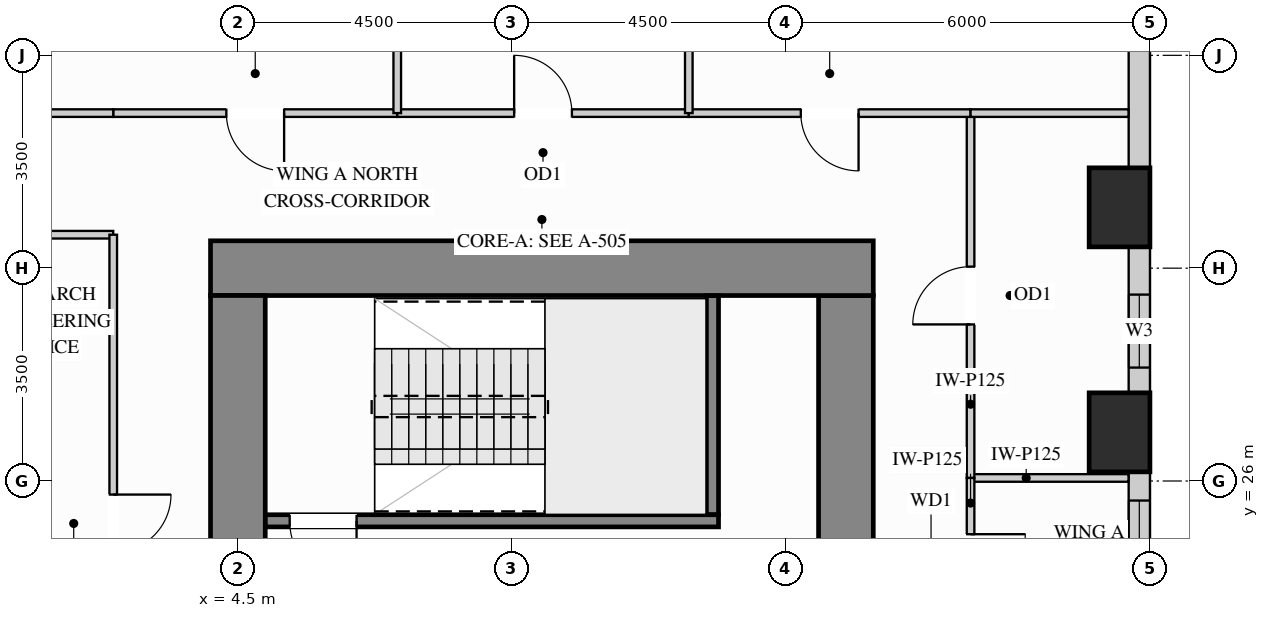
"""IFC4 building model, lengths in metres.
Left out: names, types, materials, properties, quantities, classifications, styles, units other than length and angle.
Written with IfcOpenShell. Run it as: python <this file> out.ifc"""

import sys

from ifc_helpers import new_model, si_unit, direction, frame, frame_2d, origin, origin_2d, place, context, subcontext, project, spatial, rectangle, extrude, source, transform, mapped, element, fill, save


model = new_model("IFC4")
c1 = context("Model", 3, precision=1e-05, world=origin(), true_north=direction((0.0, 1.0)))
c2 = subcontext(c1, "Body", "Model", "MODEL_VIEW")
j1 = project(units=[si_unit("LENGTHUNIT", "METRE"), si_unit("PLANEANGLEUNIT", "RADIAN")], contexts=[c1])
p1 = place(None, origin())
s1 = spatial("IfcSite", under=j1, at=p1, CompositionType="ELEMENT")
p2 = place(p1, origin())
s2 = spatial("IfcBuilding", under=s1, at=p2, CompositionType="ELEMENT")
p3 = place(p2, frame((0.0, 0.0, 58.5)))
s3 = spatial("IfcBuildingStorey", under=s2, at=p3, CompositionType="ELEMENT", Elevation=58.5)
m1 = source(origin(), c2, "Body", "SweptSolid", [
    extrude(rectangle(XDim=1.0, YDim=1.3, at=origin_2d()), origin(), (0.0, 0.0, 1.0), 3.38),
])
for number, where, z_axis, x_axis in (
    (1, (19.0, 26.8, 0.0), (0.0, 0.0, 1.0), (1.0, 0.0, 0.0)),
    (2, (19.0, 30.5, 0.0), (0.0, 0.0, 1.0), (1.0, 0.0, 0.0)),
):
    element("IfcColumn", number, at=place(p3, frame(where, z_axis=z_axis, x_axis=x_axis)), inside=s3, PredefinedType="COLUMN", context=c2, shape_type="MappedRepresentation", body=[
        mapped(m1, transform((0.0, 0.0, 0.0), x_axis=(1.0, 0.0, 0.0), y_axis=(0.0, 1.0, 0.0), z_axis=(0.0, 0.0, 1.0))),
    ])
m2 = source(origin(), c2, "Body", "SweptSolid", [
    extrude(rectangle(XDim=8.17, YDim=0.9, at=frame_2d((4.085, 0.0))), origin(), (0.0, 0.0, 1.0), 3.38),
])
p4 = place(p3, frame((14.5, 20.88, 0.0), z_axis=(0.0, 0.0, 1.0), x_axis=(0.0, 1.0, 0.0)))
e3 = element("IfcWall", 3, at=p4, inside=s3, PredefinedType="SHEAR", context=c2, shape_type="MappedRepresentation", body=[
    mapped(m2, transform((0.0, 0.0, 0.0), x_axis=(1.0, 0.0, 0.0), y_axis=(0.0, 1.0, 0.0), z_axis=(0.0, 0.0, 1.0))),
])
m3 = source(origin(), c2, "Body", "SweptSolid", [
    extrude(rectangle(XDim=10.9, YDim=0.9, at=frame_2d((5.45, 0.0))), origin(), (0.0, 0.0, 1.0), 3.38),
])
p5 = place(p3, frame((4.05, 29.5, 0.0), z_axis=(0.0, 0.0, 1.0), x_axis=(1.0, 0.0, 0.0)))
e4 = element("IfcWall", 4, at=p5, inside=s3, PredefinedType="SHEAR", context=c2, shape_type="MappedRepresentation", body=[
    mapped(m3, transform((0.0, 0.0, 0.0), x_axis=(1.0, 0.0, 0.0), y_axis=(0.0, 1.0, 0.0), z_axis=(0.0, 0.0, 1.0))),
])
m4 = source(origin(), c2, "Body", "SweptSolid", [
    extrude(rectangle(XDim=20.1, YDim=0.9, at=frame_2d((10.05, 0.0))), origin(), (0.0, 0.0, 1.0), 3.38),
])
p6 = place(p3, frame((4.5, 8.95, 0.0), z_axis=(0.0, 0.0, 1.0), x_axis=(0.0, 1.0, 0.0)))
e5 = element("IfcWall", 5, at=p6, inside=s3, PredefinedType="SHEAR", context=c2, shape_type="MappedRepresentation", body=[
    mapped(m4, transform((0.0, 0.0, 0.0), x_axis=(1.0, 0.0, 0.0), y_axis=(0.0, 1.0, 0.0), z_axis=(0.0, 0.0, 1.0))),
])
p7 = place(p3, frame((19.325, 23.148, 0.0), z_axis=(0.0, 0.0, 1.0), x_axis=(0.0, 1.0, 0.0)))
e6 = element("IfcWall", 6, at=p7, inside=s3, PredefinedType="SOLIDWALL", context=c2, shape_type="SweptSolid", body=[
    extrude(rectangle(XDim=3.004, YDim=0.35, at=frame_2d((1.502, 0.0))), origin(), (0.0, 0.0, 1.0), 2.51),
])
p8 = place(p7, frame((1.031, 0.0, 0.78)))
e7 = element("IfcOpeningElement", 7, at=p8, cuts=e6, PredefinedType="OPENING", context=c2, shape_type="SweptSolid", body=[
    extrude(rectangle(XDim=1.5, YDim=1.55, at=frame_2d((0.75, 0.775))), frame((0.0, 0.185, 0.0), z_axis=(0.0, -1.0, 0.0), x_axis=(1.0, 0.0, 0.0)), (0.0, 0.0, 1.0), 0.37),
])
p9 = place(p3, frame((19.325, 27.448, 0.0), z_axis=(0.0, 0.0, 1.0), x_axis=(0.0, 1.0, 0.0)))
e8 = element("IfcWall", 8, at=p9, inside=s3, PredefinedType="SOLIDWALL", context=c2, shape_type="SweptSolid", body=[
    extrude(rectangle(XDim=2.404, YDim=0.35, at=frame_2d((1.202, 0.0))), origin(), (0.0, 0.0, 1.0), 2.51),
])
p10 = place(p9, frame((0.417, 0.0, 0.78)))
e9 = element("IfcOpeningElement", 9, at=p10, cuts=e8, PredefinedType="OPENING", context=c2, shape_type="SweptSolid", body=[
    extrude(rectangle(XDim=1.2, YDim=1.55, at=frame_2d((0.6, 0.775))), frame((0.0, 0.185, 0.0), z_axis=(0.0, -1.0, 0.0), x_axis=(1.0, 0.0, 0.0)), (0.0, 0.0, 1.0), 0.37),
])
m5 = source(origin(), c2, "Body", "SweptSolid", [
    extrude(rectangle(XDim=3.204, YDim=0.35, at=frame_2d((1.602, 0.0))), origin(), (0.0, 0.0, 1.0), 2.51),
])
p11 = place(p3, frame((19.325, 31.148, 0.0), z_axis=(0.0, 0.0, 1.0), x_axis=(0.0, 1.0, 0.0)))
e10 = element("IfcWall", 10, at=p11, inside=s3, PredefinedType="SOLIDWALL", context=c2, shape_type="MappedRepresentation", body=[
    mapped(m5, transform((0.0, 0.0, 0.0), x_axis=(1.0, 0.0, 0.0), y_axis=(0.0, 1.0, 0.0), z_axis=(0.0, 0.0, 1.0))),
])
m6 = source(origin(), c2, "Body", "SweptSolid", [
    extrude(rectangle(XDim=2.598, YDim=0.125, at=frame_2d((1.299, 0.0))), origin(), (0.0, 0.0, 1.0), 3.365),
])
p12 = place(p3, frame((16.55, 26.05, 0.0), z_axis=(0.0, 0.0, 1.0), x_axis=(1.0, 0.0, 0.0)))
e11 = element("IfcWall", 11, at=p12, inside=s3, PredefinedType="PARTITIONING", context=c2, shape_type="MappedRepresentation", body=[
    mapped(m6, transform((0.0, 0.0, 0.0), x_axis=(1.0, 0.0, 0.0), y_axis=(0.0, 1.0, 0.0), z_axis=(0.0, 0.0, 1.0))),
])
p13 = place(p3, frame((16.55, 26.05, 0.0), z_axis=(0.0, 0.0, 1.0), x_axis=(0.0, 1.0, 0.0)))
e12 = element("IfcWall", 12, at=p13, inside=s3, PredefinedType="PARTITIONING", context=c2, shape_type="SweptSolid", body=[
    extrude(rectangle(XDim=6.0, YDim=0.125, at=frame_2d((3.0, 0.0))), origin(), (0.0, 0.0, 1.0), 3.365),
])
p14 = place(p13, frame((2.525, 0.0, 0.0)))
e13 = element("IfcOpeningElement", 13, at=p14, cuts=e12, PredefinedType="OPENING", context=c2, shape_type="SweptSolid", body=[
    extrude(rectangle(XDim=0.95, YDim=2.15, at=frame_2d((0.475, 1.075))), frame((0.0, 0.073, 0.0), z_axis=(0.0, -1.0, 0.0), x_axis=(1.0, 0.0, 0.0)), (0.0, 0.0, 1.0), 0.145),
])
p15 = place(p3, frame((16.55, 23.35, 0.0), z_axis=(0.0, 0.0, 1.0), x_axis=(0.0, 1.0, 0.0)))
e14 = element("IfcWall", 14, at=p15, inside=s3, PredefinedType="PARTITIONING", context=c2, shape_type="SweptSolid", body=[
    extrude(rectangle(XDim=2.7, YDim=0.125, at=frame_2d((1.35, 0.0))), origin(), (0.0, 0.0, 1.0), 3.365),
])
p16 = place(p15, frame((0.875, 0.0, 0.0)))
e15 = element("IfcOpeningElement", 15, at=p16, cuts=e14, PredefinedType="OPENING", context=c2, shape_type="SweptSolid", body=[
    extrude(rectangle(XDim=0.9, YDim=2.15, at=frame_2d((0.45, 1.075))), frame((0.0, 0.073, 0.0), z_axis=(0.0, -1.0, 0.0), x_axis=(1.0, 0.0, 0.0)), (0.0, 0.0, 1.0), 0.145),
])
p17 = place(p3, frame((2.45, 32.05, 0.0), z_axis=(0.0, 0.0, 1.0), x_axis=(1.0, 0.0, 0.0)))
e16 = element("IfcWall", 16, at=p17, inside=s3, PredefinedType="PARTITIONING", context=c2, shape_type="SweptSolid", body=[
    extrude(rectangle(XDim=4.671, YDim=0.125, at=frame_2d((2.335, 0.0))), origin(), (0.0, 0.0, 1.0), 3.365),
])
p18 = place(p17, frame((1.861, 0.0, 0.0)))
e17 = element("IfcOpeningElement", 17, at=p18, cuts=e16, PredefinedType="OPENING", context=c2, shape_type="SweptSolid", body=[
    extrude(rectangle(XDim=0.95, YDim=2.15, at=frame_2d((0.475, 1.075))), frame((0.0, 0.073, 0.0), z_axis=(0.0, -1.0, 0.0), x_axis=(1.0, 0.0, 0.0)), (0.0, 0.0, 1.0), 0.145),
])
p19 = place(p3, frame((7.121, 32.05, 0.0), z_axis=(0.0, 0.0, 1.0), x_axis=(1.0, 0.0, 0.0)))
e18 = element("IfcWall", 18, at=p19, inside=s3, PredefinedType="PARTITIONING", context=c2, shape_type="SweptSolid", body=[
    extrude(rectangle(XDim=4.795, YDim=0.125, at=frame_2d((2.397, 0.0))), origin(), (0.0, 0.0, 1.0), 3.365),
])
p20 = place(p19, frame((1.923, 0.0, 0.0)))
e19 = element("IfcOpeningElement", 19, at=p20, cuts=e18, PredefinedType="OPENING", context=c2, shape_type="SweptSolid", body=[
    extrude(rectangle(XDim=0.95, YDim=2.15, at=frame_2d((0.475, 1.075))), frame((0.0, 0.073, 0.0), z_axis=(0.0, -1.0, 0.0), x_axis=(1.0, 0.0, 0.0)), (0.0, 0.0, 1.0), 0.145),
])
p21 = place(p3, frame((11.916, 32.05, 0.0), z_axis=(0.0, 0.0, 1.0), x_axis=(1.0, 0.0, 0.0)))
e20 = element("IfcWall", 20, at=p21, inside=s3, PredefinedType="PARTITIONING", context=c2, shape_type="SweptSolid", body=[
    extrude(rectangle(XDim=4.634, YDim=0.125, at=frame_2d((2.317, 0.0))), origin(), (0.0, 0.0, 1.0), 3.365),
])
p22 = place(p21, frame((1.842, 0.0, 0.0)))
e21 = element("IfcOpeningElement", 21, at=p22, cuts=e20, PredefinedType="OPENING", context=c2, shape_type="SweptSolid", body=[
    extrude(rectangle(XDim=0.95, YDim=2.15, at=frame_2d((0.475, 1.075))), frame((0.0, 0.073, 0.0), z_axis=(0.0, -1.0, 0.0), x_axis=(1.0, 0.0, 0.0)), (0.0, 0.0, 1.0), 0.145),
])
p23 = place(p3, frame((16.55, 32.05, 0.0), z_axis=(0.0, 0.0, 1.0), x_axis=(1.0, 0.0, 0.0)))
e22 = element("IfcWall", 22, at=p23, inside=s3, PredefinedType="PARTITIONING", context=c2, shape_type="MappedRepresentation", body=[
    mapped(m6, transform((0.0, 0.0, 0.0), x_axis=(1.0, 0.0, 0.0), y_axis=(0.0, 1.0, 0.0), z_axis=(0.0, 0.0, 1.0))),
])
m7 = source(origin(), c2, "Body", "SweptSolid", [
    extrude(rectangle(XDim=2.098, YDim=0.125, at=frame_2d((1.049, 0.0))), origin(), (0.0, 0.0, 1.0), 3.365),
])
p24 = place(p3, frame((0.352, 32.05, 0.0), z_axis=(0.0, 0.0, 1.0), x_axis=(1.0, 0.0, 0.0)))
e23 = element("IfcWall", 23, at=p24, inside=s3, PredefinedType="PARTITIONING", context=c2, shape_type="MappedRepresentation", body=[
    mapped(m7, transform((0.0, 0.0, 0.0), x_axis=(1.0, 0.0, 0.0), y_axis=(0.0, 1.0, 0.0), z_axis=(0.0, 0.0, 1.0))),
])
m8 = source(origin(), c2, "Body", "SweptSolid", [
    extrude(rectangle(XDim=17.598, YDim=0.125, at=frame_2d((8.799, 0.0))), origin(), (0.0, 0.0, 1.0), 3.365),
])
for number, where, z_axis, x_axis in (
    (24, (7.121, 32.05, 0.0), (0.0, 0.0, 1.0), (0.0, 1.0, 0.0)),
    (25, (11.916, 32.05, 0.0), (0.0, 0.0, 1.0), (0.0, 1.0, 0.0)),
):
    element("IfcWall", number, at=place(p3, frame(where, z_axis=z_axis, x_axis=x_axis)), inside=s3, PredefinedType="PARTITIONING", context=c2, shape_type="MappedRepresentation", body=[
        mapped(m8, transform((0.0, 0.0, 0.0), x_axis=(1.0, 0.0, 0.0), y_axis=(0.0, 1.0, 0.0), z_axis=(0.0, 0.0, 1.0))),
    ])
m9 = source(origin(), c2, "Body", "SweptSolid", [
    extrude(rectangle(XDim=1.19, YDim=0.125, at=frame_2d((0.595, 0.0))), origin(), (0.0, 0.0, 1.0), 3.365),
])
p25 = place(p3, frame((1.26, 30.05, 0.0), z_axis=(0.0, 0.0, 1.0), x_axis=(1.0, 0.0, 0.0)))
e26 = element("IfcWall", 26, at=p25, inside=s3, PredefinedType="PARTITIONING", context=c2, shape_type="MappedRepresentation", body=[
    mapped(m9, transform((0.0, 0.0, 0.0), x_axis=(1.0, 0.0, 0.0), y_axis=(0.0, 1.0, 0.0), z_axis=(0.0, 0.0, 1.0))),
])
p26 = place(p3, frame((2.45, 22.6, 0.0), z_axis=(0.0, 0.0, 1.0), x_axis=(0.0, 1.0, 0.0)))
e27 = element("IfcWall", 27, at=p26, inside=s3, PredefinedType="PARTITIONING", context=c2, shape_type="SweptSolid", body=[
    extrude(rectangle(XDim=7.45, YDim=0.125, at=frame_2d((3.725, 0.0))), origin(), (0.0, 0.0, 1.0), 3.365),
])
p27 = place(p26, frame((2.227, 0.0, 0.0)))
e28 = element("IfcOpeningElement", 28, at=p27, cuts=e27, PredefinedType="OPENING", context=c2, shape_type="SweptSolid", body=[
    extrude(rectangle(XDim=0.95, YDim=2.15, at=frame_2d((0.475, 1.075))), frame((0.0, 0.073, 0.0), z_axis=(0.0, -1.0, 0.0), x_axis=(1.0, 0.0, 0.0)), (0.0, 0.0, 1.0), 0.145),
])
m10 = source(origin(), c2, "Body", "SweptSolid", [
    extrude(rectangle(XDim=3.603, YDim=0.2, at=frame_2d((1.802, 0.0))), origin(), (0.0, 0.0, 1.0), 3.38),
])
p28 = place(p3, frame((12.305, 25.445, 0.0), z_axis=(0.0, 0.0, 1.0), x_axis=(0.0, 1.0, 0.0)))
e29 = element("IfcWall", 29, at=p28, inside=s3, PredefinedType="SHEAR", context=c2, shape_type="MappedRepresentation", body=[
    mapped(m10, transform((0.0, 0.0, 0.0), x_axis=(1.0, 0.0, 0.0), y_axis=(0.0, 1.0, 0.0), z_axis=(0.0, 0.0, 1.0))),
])
p29 = place(p3, frame((4.952, 25.345, 0.0), z_axis=(0.0, 0.0, 1.0), x_axis=(1.0, 0.0, 0.0)))
e30 = element("IfcWall", 30, at=p29, inside=s3, PredefinedType="SHEAR", context=c2, shape_type="SweptSolid", body=[
    extrude(rectangle(XDim=7.453, YDim=0.2, at=frame_2d((3.727, 0.0))), origin(), (0.0, 0.0, 1.0), 3.38),
])
p30 = place(p29, frame((0.4, 0.0, 0.0)))
e31 = element("IfcOpeningElement", 31, at=p30, cuts=e30, PredefinedType="OPENING", context=c2, shape_type="SweptSolid", body=[
    extrude(rectangle(XDim=1.1, YDim=2.15, at=frame_2d((0.55, 1.075))), frame((0.0, 0.11, 0.0), z_axis=(0.0, -1.0, 0.0), x_axis=(1.0, 0.0, 0.0)), (0.0, 0.0, 1.0), 0.22),
])
m11 = source(origin(), c2, "Body", "SweptSolid", [
    extrude(rectangle(XDim=0.95, YDim=2.15, at=frame_2d((0.475, 1.075))), frame((0.0, 0.025, 0.0), z_axis=(0.0, -1.0, 0.0), x_axis=(1.0, 0.0, 0.0)), (0.0, 0.0, 1.0), 0.05),
])
p31 = place(p14, origin())
e32 = element("IfcDoor", 32, at=p31, inside=s3, OperationType="SINGLE_SWING_LEFT", PredefinedType="DOOR", context=c2, shape_type="MappedRepresentation", body=[
    mapped(m11, transform((0.0, 0.0, 0.0), x_axis=(1.0, 0.0, 0.0), y_axis=(0.0, 1.0, 0.0), z_axis=(0.0, 0.0, 1.0))),
])
fill(e13, e32)
p32 = place(p18, origin())
e33 = element("IfcDoor", 33, at=p32, inside=s3, OperationType="SINGLE_SWING_RIGHT", PredefinedType="DOOR", context=c2, shape_type="MappedRepresentation", body=[
    mapped(m11, transform((0.0, 0.0, 0.0), x_axis=(1.0, 0.0, 0.0), y_axis=(0.0, 1.0, 0.0), z_axis=(0.0, 0.0, 1.0))),
])
fill(e17, e33)
p33 = place(p20, origin())
e34 = element("IfcDoor", 34, at=p33, inside=s3, OperationType="SINGLE_SWING_LEFT", PredefinedType="DOOR", context=c2, shape_type="MappedRepresentation", body=[
    mapped(m11, transform((0.0, 0.0, 0.0), x_axis=(1.0, 0.0, 0.0), y_axis=(0.0, 1.0, 0.0), z_axis=(0.0, 0.0, 1.0))),
])
fill(e19, e34)
p34 = place(p22, origin())
e35 = element("IfcDoor", 35, at=p34, inside=s3, OperationType="SINGLE_SWING_RIGHT", PredefinedType="DOOR", context=c2, shape_type="MappedRepresentation", body=[
    mapped(m11, transform((0.0, 0.0, 0.0), x_axis=(1.0, 0.0, 0.0), y_axis=(0.0, 1.0, 0.0), z_axis=(0.0, 0.0, 1.0))),
])
fill(e21, e35)
p35 = place(p27, origin())
e36 = element("IfcDoor", 36, at=p35, inside=s3, OperationType="SINGLE_SWING_RIGHT", PredefinedType="DOOR", context=c2, shape_type="MappedRepresentation", body=[
    mapped(m11, transform((0.0, 0.0, 0.0), x_axis=(1.0, 0.0, 0.0), y_axis=(0.0, 1.0, 0.0), z_axis=(0.0, 0.0, 1.0))),
])
fill(e28, e36)
m12 = source(origin(), c2, "Body", "SweptSolid", [
    extrude(rectangle(XDim=1.1, YDim=2.15, at=frame_2d((0.55, 1.075))), frame((0.0, 0.025, 0.0), z_axis=(0.0, -1.0, 0.0), x_axis=(1.0, 0.0, 0.0)), (0.0, 0.0, 1.0), 0.05),
])
p36 = place(p30, origin())
e37 = element("IfcDoor", 37, at=p36, inside=s3, OperationType="SINGLE_SWING_RIGHT", PredefinedType="DOOR", context=c2, shape_type="MappedRepresentation", body=[
    mapped(m12, transform((0.0, 0.0, 0.0), x_axis=(1.0, 0.0, 0.0), y_axis=(0.0, 1.0, 0.0), z_axis=(0.0, 0.0, 1.0))),
])
fill(e31, e37)
m13 = source(origin(), c2, "Body", "SweptSolid", [
    extrude(rectangle(XDim=0.9, YDim=2.15, at=frame_2d((0.45, 1.075))), frame((0.0, 0.025, 0.0), z_axis=(0.0, -1.0, 0.0), x_axis=(1.0, 0.0, 0.0)), (0.0, 0.0, 1.0), 0.05),
])
p37 = place(p16, origin())
e38 = element("IfcDoor", 38, at=p37, inside=s3, OperationType="SINGLE_SWING_RIGHT", PredefinedType="DOOR", context=c2, shape_type="MappedRepresentation", body=[
    mapped(m13, transform((0.0, 0.0, 0.0), x_axis=(1.0, 0.0, 0.0), y_axis=(0.0, 1.0, 0.0), z_axis=(0.0, 0.0, 1.0))),
])
fill(e15, e38)
m14 = source(origin(), c2, "Body", "SweptSolid", [
    extrude(rectangle(XDim=1.2, YDim=1.55, at=frame_2d((0.6, 0.775))), frame((0.0, 0.03, 0.0), z_axis=(0.0, -1.0, 0.0), x_axis=(1.0, 0.0, 0.0)), (0.0, 0.0, 1.0), 0.06),
])
p38 = place(p10, origin())
e39 = element("IfcWindow", 39, at=p38, inside=s3, PartitioningType="SINGLE_PANEL", PredefinedType="WINDOW", context=c2, shape_type="MappedRepresentation", body=[
    mapped(m14, transform((0.0, 0.0, 0.0), x_axis=(1.0, 0.0, 0.0), y_axis=(0.0, 1.0, 0.0), z_axis=(0.0, 0.0, 1.0))),
])
fill(e9, e39)
m15 = source(origin(), c2, "Body", "SweptSolid", [
    extrude(rectangle(XDim=1.5, YDim=1.55, at=frame_2d((0.75, 0.775))), frame((0.0, 0.03, 0.0), z_axis=(0.0, -1.0, 0.0), x_axis=(1.0, 0.0, 0.0)), (0.0, 0.0, 1.0), 0.06),
])
p39 = place(p8, origin())
e40 = element("IfcWindow", 40, at=p39, inside=s3, PartitioningType="SINGLE_PANEL", PredefinedType="WINDOW", context=c2, shape_type="MappedRepresentation", body=[
    mapped(m15, transform((0.0, 0.0, 0.0), x_axis=(1.0, 0.0, 0.0), y_axis=(0.0, 1.0, 0.0), z_axis=(0.0, 0.0, 1.0))),
])
fill(e7, e40)
save(model, sys.argv[1])
